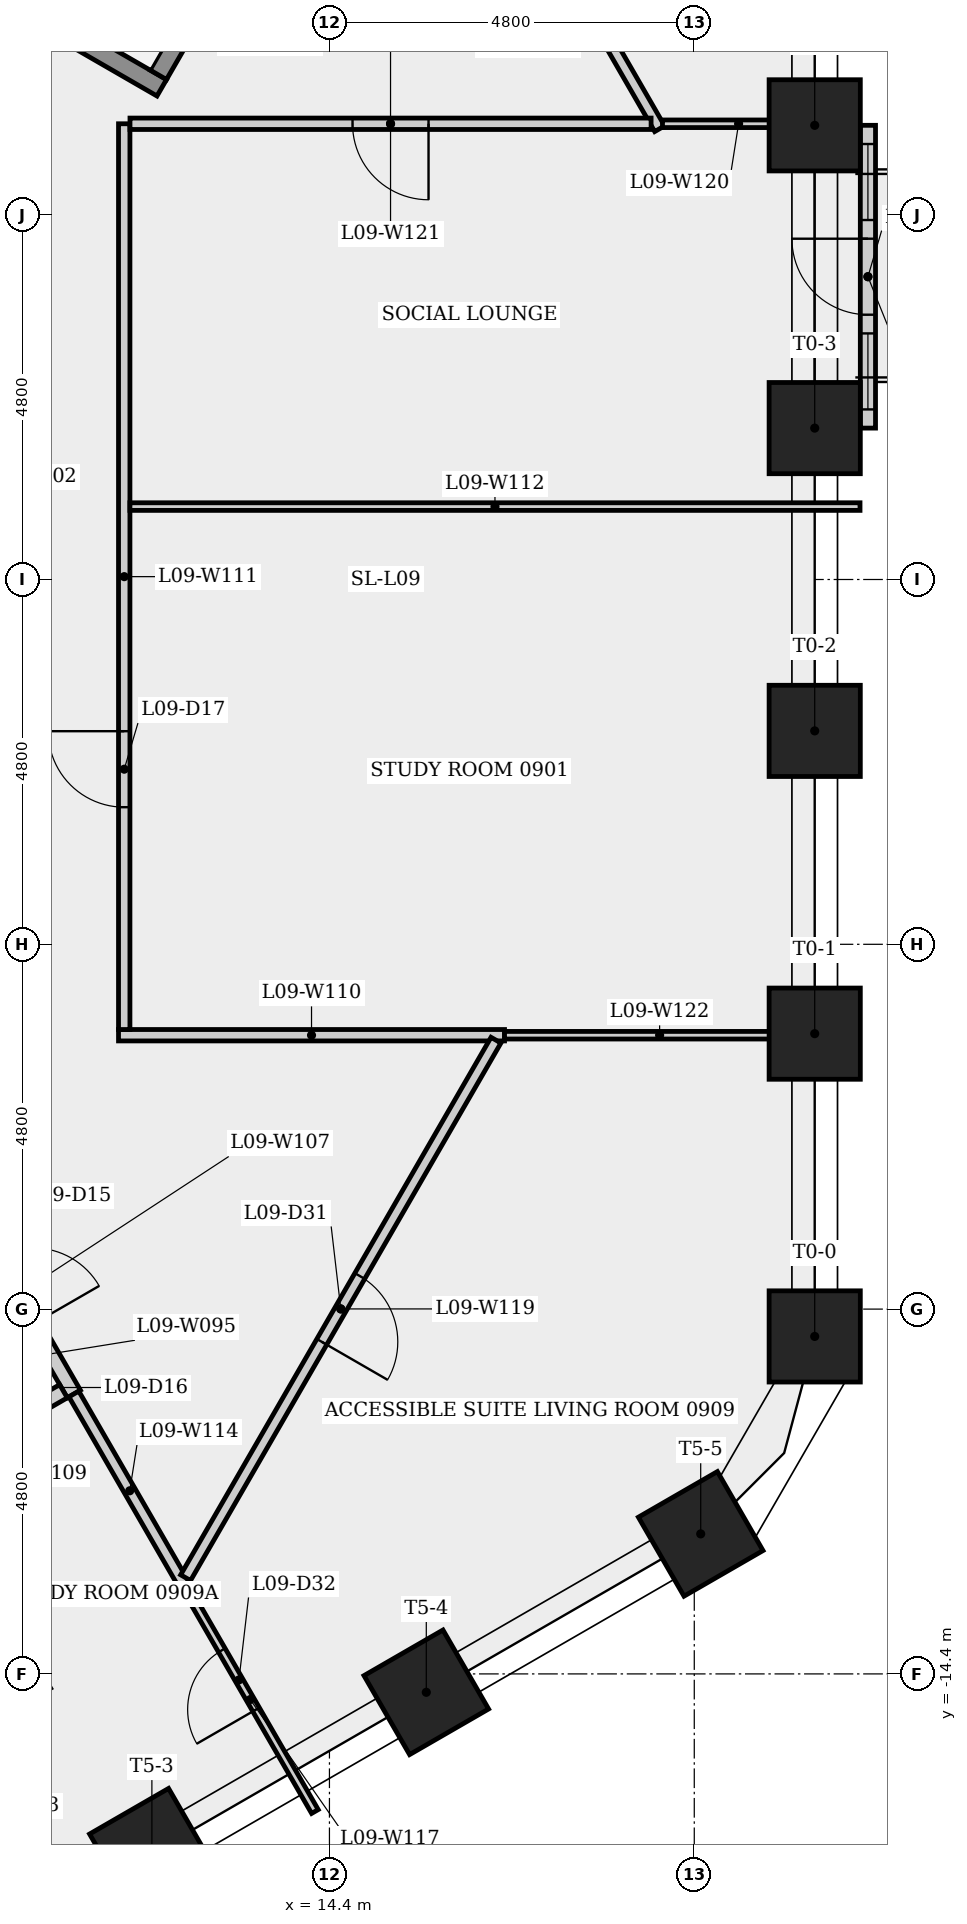
"""IFC4 building model, lengths in metres.
Left out: names, types, materials, properties, quantities, classifications, styles, units other than length and angle.
Written with IfcOpenShell. Run it as: python <this file> out.ifc"""

import sys

from ifc_helpers import new_model, si_unit, direction, frame, frame_2d, origin, origin_2d, place, context, subcontext, project, spatial, rectangle, extrude, element, fill, save


model = new_model("IFC4")
c1 = context("Model", 3, precision=1e-05, world=origin(), true_north=direction((0.0, 1.0)))
c2 = subcontext(c1, "Body", "Model", "MODEL_VIEW")
j1 = project(units=[si_unit("LENGTHUNIT", "METRE"), si_unit("PLANEANGLEUNIT", "RADIAN")], contexts=[c1])
p1 = place(None, origin())
s1 = spatial("IfcSite", under=j1, at=p1, CompositionType="ELEMENT")
p2 = place(p1, origin())
s2 = spatial("IfcBuilding", under=s1, at=p2, CompositionType="ELEMENT")
p3 = place(p2, frame((0.0, 0.0, 39.1)))
s3 = spatial("IfcBuildingStorey", under=s2, at=p3, CompositionType="ELEMENT", Elevation=39.1)
for number, where, z_axis, x_axis in (
    (1, (20.785, -9.959, 0.0), (0.0, 0.0, 1.0), (1.0, 0.0, 0.0)),
    (2, (20.785, -5.976, 0.0), (0.0, 0.0, 1.0), (1.0, 0.0, 0.0)),
    (3, (20.785, -1.992, 0.0), (0.0, 0.0, 1.0), (1.0, 0.0, 0.0)),
    (4, (20.785, 1.992, 0.0), (0.0, 0.0, 1.0), (1.0, 0.0, 0.0)),
    (5, (20.785, 5.976, 0.0), (0.0, 0.0, 1.0), (1.0, 0.0, 0.0)),
    (6, (12.064, -16.727, 0.0), (0.0, 0.0, 1.0), (0.5, -0.866, 0.0)),
    (7, (15.674, -14.642, 0.0), (0.0, 0.0, 1.0), (0.5, -0.866, 0.0)),
    (8, (19.285, -12.558, 0.0), (0.0, 0.0, 1.0), (0.5, -0.866, 0.0)),
):
    element("IfcColumn", number, at=place(p3, frame(where, z_axis=z_axis, x_axis=x_axis)), inside=s3, PredefinedType="COLUMN", context=c2, shape_type="SweptSolid", body=[
        extrude(rectangle(XDim=1.2, YDim=1.2, at=origin_2d()), origin(), (0.0, 0.0, 1.0), 3.4),
    ])
p4 = place(p3, frame((21.485, 1.992, 0.0), z_axis=(0.0, 0.0, 1.0), x_axis=(0.0, 1.0, 0.0)))
e9 = element("IfcWall", 9, at=p4, inside=s3, PredefinedType="SOLIDWALL", context=c2, shape_type="SweptSolid", body=[
    extrude(rectangle(XDim=3.984, YDim=0.2, at=frame_2d((1.992, 0.0))), origin(), (0.0, 0.0, 1.0), 3.4),
])
p5 = place(p4, frame((1.492, 0.0, 0.0)))
e10 = element("IfcOpeningElement", 10, at=p5, cuts=e9, PredefinedType="OPENING", context=c2, shape_type="SweptSolid", body=[
    extrude(rectangle(XDim=1.0, YDim=2.4, at=frame_2d((0.5, 1.2))), frame((0.0, 0.11, 0.0), z_axis=(0.0, -1.0, 0.0), x_axis=(1.0, 0.0, 0.0)), (0.0, 0.0, 1.0), 0.22),
])
p6 = place(p4, frame((0.246, 0.0, 0.9)))
e11 = element("IfcOpeningElement", 11, at=p6, cuts=e9, PredefinedType="OPENING", context=c2, shape_type="SweptSolid", body=[
    extrude(rectangle(XDim=1.0, YDim=1.5, at=frame_2d((0.5, 0.75))), frame((0.0, 0.11, 0.0), z_axis=(0.0, -1.0, 0.0), x_axis=(1.0, 0.0, 0.0)), (0.0, 0.0, 1.0), 0.22),
])
p7 = place(p4, frame((2.738, 0.0, 0.9)))
e12 = element("IfcOpeningElement", 12, at=p7, cuts=e9, PredefinedType="OPENING", context=c2, shape_type="SweptSolid", body=[
    extrude(rectangle(XDim=1.0, YDim=1.5, at=frame_2d((0.5, 0.75))), frame((0.0, 0.11, 0.0), z_axis=(0.0, -1.0, 0.0), x_axis=(1.0, 0.0, 0.0)), (0.0, 0.0, 1.0), 0.22),
])
p8 = place(p3, frame((9.537, -8.119, 0.0), z_axis=(0.0, 0.0, 1.0), x_axis=(0.499990139034, -0.866031096941, 0.0)))
e13 = element("IfcWall", 13, at=p8, inside=s3, PredefinedType="PARTITIONING", context=c2, shape_type="SweptSolid", body=[
    extrude(rectangle(XDim=3.0, YDim=0.2, at=frame_2d((1.5, 0.0))), origin(), (0.0, 0.0, 1.0), 3.05),
])
p9 = place(p8, frame((0.935, 0.0, 0.0)))
e14 = element("IfcOpeningElement", 14, at=p9, cuts=e13, PredefinedType="OPENING", context=c2, shape_type="SweptSolid", body=[
    extrude(rectangle(XDim=1.0, YDim=2.1, at=frame_2d((0.5, 1.05))), frame((0.0, 0.11, 0.0), z_axis=(0.0, -1.0, 0.0), x_axis=(1.0, 0.0, 0.0)), (0.0, 0.0, 1.0), 0.22),
])
p10 = place(p3, frame((10.901, -10.681, 0.0), z_axis=(0.0, 0.0, 1.0), x_axis=(-0.866009402589, -0.500027713859, 0.0)))
e15 = element("IfcWall", 15, at=p10, inside=s3, PredefinedType="PARTITIONING", context=c2, shape_type="SweptSolid", body=[
    extrude(rectangle(XDim=2.1, YDim=0.2, at=frame_2d((1.05, 0.0))), origin(), (0.0, 0.0, 1.0), 3.05),
])
p11 = place(p3, frame((11.625, -5.996, 0.0), z_axis=(0.0, 0.0, 1.0), x_axis=(1.0, 0.0, 0.0)))
e16 = element("IfcWall", 16, at=p11, inside=s3, PredefinedType="PARTITIONING", context=c2, shape_type="SweptSolid", body=[
    extrude(rectangle(XDim=5.079, YDim=0.15, at=frame_2d((2.539, 0.0))), origin(), (0.0, 0.0, 1.0), 3.05),
])
p12 = place(p3, frame((11.7, -5.921, 0.0), z_axis=(0.0, 0.0, 1.0), x_axis=(0.0, 1.0, 0.0)))
e17 = element("IfcWall", 17, at=p12, inside=s3, PredefinedType="PARTITIONING", context=c2, shape_type="SweptSolid", body=[
    extrude(rectangle(XDim=11.918, YDim=0.15, at=frame_2d((5.959, 0.0))), origin(), (0.0, 0.0, 1.0), 3.05),
])
p13 = place(p12, frame((2.925, 0.0, 0.0)))
e18 = element("IfcOpeningElement", 18, at=p13, cuts=e17, PredefinedType="OPENING", context=c2, shape_type="SweptSolid", body=[
    extrude(rectangle(XDim=1.0, YDim=2.1, at=frame_2d((0.5, 1.05))), frame((0.0, 0.085, 0.0), z_axis=(0.0, -1.0, 0.0), x_axis=(1.0, 0.0, 0.0)), (0.0, 0.0, 1.0), 0.17),
])
p14 = place(p3, frame((11.775, 0.959, 0.0), z_axis=(0.0, 0.0, 1.0), x_axis=(1.0, 0.0, 0.0)))
e19 = element("IfcWall", 19, at=p14, inside=s3, PredefinedType="PARTITIONING", context=c2, shape_type="SweptSolid", body=[
    extrude(rectangle(XDim=9.606, YDim=0.1, at=frame_2d((4.803, 0.0))), origin(), (0.0, 0.0, 1.0), 3.05),
])
p15 = place(p3, frame((12.194, 6.47, 0.0), z_axis=(0.0, 0.0, 1.0), x_axis=(-0.866025499775, 0.499999833739, 0.0)))
e20 = element("IfcWall", 20, at=p15, inside=s3, PredefinedType="SHEAR", context=c2, shape_type="SweptSolid", body=[
    extrude(rectangle(XDim=6.4, YDim=0.25, at=frame_2d((3.2, 0.0))), origin(), (0.0, 0.0, 1.0), 3.05),
])
p16 = place(p15, frame((5.25, 0.0, 0.0)))
e21 = element("IfcOpeningElement", 21, at=p16, cuts=e20, PredefinedType="OPENING", context=c2, shape_type="SweptSolid", body=[
    extrude(rectangle(XDim=1.0, YDim=2.1, at=frame_2d((0.5, 1.05))), frame((0.0, 0.135, 0.0), z_axis=(0.0, -1.0, 0.0), x_axis=(1.0, 0.0, 0.0)), (0.0, 0.0, 1.0), 0.27),
])
p17 = place(p3, frame((12.508, -13.264, 0.0), z_axis=(0.0, 0.0, 1.0), x_axis=(-0.499942839543, 0.866058402875, 0.0)))
e22 = element("IfcWall", 22, at=p17, inside=s3, PredefinedType="PARTITIONING", context=c2, shape_type="SweptSolid", body=[
    extrude(rectangle(XDim=2.941, YDim=0.15, at=frame_2d((1.47, 0.0))), origin(), (0.0, 0.0, 1.0), 3.05),
])
p18 = place(p3, frame((13.523, 9.022, 0.0), z_axis=(0.0, 0.0, 1.0), x_axis=(-0.500034990121, -0.866005201286, 0.0)))
e23 = element("IfcWall", 23, at=p18, inside=s3, PredefinedType="SHEAR", context=c2, shape_type="SweptSolid", body=[
    extrude(rectangle(XDim=2.75, YDim=0.25, at=frame_2d((1.375, 0.0))), origin(), (0.0, 0.0, 1.0), 3.05),
])
p19 = place(p3, frame((14.209, -16.211, 0.0), z_axis=(0.0, 0.0, 1.0), x_axis=(-0.500020569521, 0.86601352764, 0.0)))
e24 = element("IfcWall", 24, at=p19, inside=s3, PredefinedType="PARTITIONING", context=c2, shape_type="SweptSolid", body=[
    extrude(rectangle(XDim=3.403, YDim=0.1, at=frame_2d((1.701, 0.0))), origin(), (0.0, 0.0, 1.0), 3.05),
])
p20 = place(p19, frame((1.549, 0.0, 0.0)))
e25 = element("IfcOpeningElement", 25, at=p20, cuts=e24, PredefinedType="OPENING", context=c2, shape_type="SweptSolid", body=[
    extrude(rectangle(XDim=0.9, YDim=2.1, at=frame_2d((0.45, 1.05))), frame((0.0, 0.06, 0.0), z_axis=(0.0, -1.0, 0.0), x_axis=(1.0, 0.0, 0.0)), (0.0, 0.0, 1.0), 0.12),
])
p21 = place(p3, frame((15.279, 11.934, 0.0), z_axis=(0.0, 0.0, 1.0), x_axis=(0.500007034647, -0.866021342291, 0.0)))
e26 = element("IfcWall", 26, at=p21, inside=s3, PredefinedType="PARTITIONING", context=c2, shape_type="SweptSolid", body=[
    extrude(rectangle(XDim=6.931, YDim=0.15, at=frame_2d((3.466, 0.0))), origin(), (0.0, 0.0, 1.0), 3.05),
])
p22 = place(p21, frame((2.911, 0.0, 0.0)))
e27 = element("IfcOpeningElement", 27, at=p22, cuts=e26, PredefinedType="OPENING", context=c2, shape_type="SweptSolid", body=[
    extrude(rectangle(XDim=1.0, YDim=2.1, at=frame_2d((0.5, 1.05))), frame((0.0, 0.085, 0.0), z_axis=(0.0, -1.0, 0.0), x_axis=(1.0, 0.0, 0.0)), (0.0, 0.0, 1.0), 0.17),
])
p23 = place(p3, frame((16.591, -6.061, 0.0), z_axis=(0.0, 0.0, 1.0), x_axis=(-0.500016592557, -0.866015823855, 0.0)))
e28 = element("IfcWall", 28, at=p23, inside=s3, PredefinedType="PARTITIONING", context=c2, shape_type="SweptSolid", body=[
    extrude(rectangle(XDim=8.167, YDim=0.15, at=frame_2d((4.083, 0.0))), origin(), (0.0, 0.0, 1.0), 3.05),
])
p24 = place(p23, frame((3.583, 0.0, 0.0)))
e29 = element("IfcOpeningElement", 29, at=p24, cuts=e28, PredefinedType="OPENING", context=c2, shape_type="SweptSolid", body=[
    extrude(rectangle(XDim=1.0, YDim=2.1, at=frame_2d((0.5, 1.05))), frame((0.0, 0.085, 0.0), z_axis=(0.0, -1.0, 0.0), x_axis=(1.0, 0.0, 0.0)), (0.0, 0.0, 1.0), 0.17),
])
p25 = place(p3, frame((18.782, 5.996, 0.0), z_axis=(0.0, 0.0, 1.0), x_axis=(1.0, 0.0, 0.0)))
e30 = element("IfcWall", 30, at=p25, inside=s3, PredefinedType="PARTITIONING", context=c2, shape_type="SweptSolid", body=[
    extrude(rectangle(XDim=2.003, YDim=0.1, at=frame_2d((1.001, 0.0))), origin(), (0.0, 0.0, 1.0), 3.05),
])
p26 = place(p3, frame((18.632, 5.996, 0.0), z_axis=(0.0, 0.0, 1.0), x_axis=(-1.0, 0.0, 0.0)))
e31 = element("IfcWall", 31, at=p26, inside=s3, PredefinedType="PARTITIONING", context=c2, shape_type="SweptSolid", body=[
    extrude(rectangle(XDim=6.856, YDim=0.15, at=frame_2d((3.428, 0.0))), origin(), (0.0, 0.0, 1.0), 3.05),
])
p27 = place(p26, frame((2.928, 0.0, 0.0)))
e32 = element("IfcOpeningElement", 32, at=p27, cuts=e31, PredefinedType="OPENING", context=c2, shape_type="SweptSolid", body=[
    extrude(rectangle(XDim=1.0, YDim=2.1, at=frame_2d((0.5, 1.05))), frame((0.0, 0.085, 0.0), z_axis=(0.0, -1.0, 0.0), x_axis=(1.0, 0.0, 0.0)), (0.0, 0.0, 1.0), 0.17),
])
p28 = place(p3, frame((20.785, -5.996, 0.0), z_axis=(0.0, 0.0, 1.0), x_axis=(-1.0, 0.0, 0.0)))
e33 = element("IfcWall", 33, at=p28, inside=s3, PredefinedType="PARTITIONING", context=c2, shape_type="SweptSolid", body=[
    extrude(rectangle(XDim=4.081, YDim=0.1, at=frame_2d((2.041, 0.0))), origin(), (0.0, 0.0, 1.0), 3.05),
])
p29 = place(p5, origin())
e34 = element("IfcDoor", 34, at=p29, inside=s3, OperationType="SINGLE_SWING_RIGHT", PredefinedType="DOOR", context=c2, shape_type="SweptSolid", body=[
    extrude(rectangle(XDim=1.0, YDim=2.4, at=frame_2d((0.5, 1.2))), frame((0.0, 0.025, 0.0), z_axis=(0.0, -1.0, 0.0), x_axis=(1.0, 0.0, 0.0)), (0.0, 0.0, 1.0), 0.05),
])
fill(e10, e34)
p30 = place(p6, origin())
e35 = element("IfcWindow", 35, at=p30, inside=s3, PartitioningType="SINGLE_PANEL", PredefinedType="WINDOW", context=c2, shape_type="SweptSolid", body=[
    extrude(rectangle(XDim=1.0, YDim=1.5, at=frame_2d((0.5, 0.75))), frame((0.0, 0.03, 0.0), z_axis=(0.0, -1.0, 0.0), x_axis=(1.0, 0.0, 0.0)), (0.0, 0.0, 1.0), 0.06),
])
fill(e11, e35)
p31 = place(p7, origin())
e36 = element("IfcWindow", 36, at=p31, inside=s3, PartitioningType="SINGLE_PANEL", PredefinedType="WINDOW", context=c2, shape_type="SweptSolid", body=[
    extrude(rectangle(XDim=1.0, YDim=1.5, at=frame_2d((0.5, 0.75))), frame((0.0, 0.03, 0.0), z_axis=(0.0, -1.0, 0.0), x_axis=(1.0, 0.0, 0.0)), (0.0, 0.0, 1.0), 0.06),
])
fill(e12, e36)
p32 = place(p13, origin())
e37 = element("IfcDoor", 37, at=p32, inside=s3, OperationType="SINGLE_SWING_RIGHT", PredefinedType="DOOR", context=c2, shape_type="SweptSolid", body=[
    extrude(rectangle(XDim=1.0, YDim=2.1, at=frame_2d((0.5, 1.05))), frame((0.0, 0.025, 0.0), z_axis=(0.0, -1.0, 0.0), x_axis=(1.0, 0.0, 0.0)), (0.0, 0.0, 1.0), 0.05),
])
fill(e18, e37)
p33 = place(p27, origin())
e38 = element("IfcDoor", 38, at=p33, inside=s3, OperationType="SINGLE_SWING_LEFT", PredefinedType="DOOR", context=c2, shape_type="SweptSolid", body=[
    extrude(rectangle(XDim=1.0, YDim=2.1, at=frame_2d((0.5, 1.05))), frame((0.0, 0.025, 0.0), z_axis=(0.0, -1.0, 0.0), x_axis=(1.0, 0.0, 0.0)), (0.0, 0.0, 1.0), 0.05),
])
fill(e32, e38)
p34 = place(p24, origin())
e39 = element("IfcDoor", 39, at=p34, inside=s3, OperationType="SINGLE_SWING_RIGHT", PredefinedType="DOOR", context=c2, shape_type="SweptSolid", body=[
    extrude(rectangle(XDim=1.0, YDim=2.1, at=frame_2d((0.5, 1.05))), frame((0.0, 0.025, 0.0), z_axis=(0.0, -1.0, 0.0), x_axis=(1.0, 0.0, 0.0)), (0.0, 0.0, 1.0), 0.05),
])
fill(e29, e39)
p35 = place(p20, origin())
e40 = element("IfcDoor", 40, at=p35, inside=s3, OperationType="SINGLE_SWING_LEFT", PredefinedType="DOOR", context=c2, shape_type="SweptSolid", body=[
    extrude(rectangle(XDim=0.9, YDim=2.1, at=frame_2d((0.45, 1.05))), frame((0.0, 0.025, 0.0), z_axis=(0.0, -1.0, 0.0), x_axis=(1.0, 0.0, 0.0)), (0.0, 0.0, 1.0), 0.05),
])
fill(e25, e40)
save(model, sys.argv[1])
